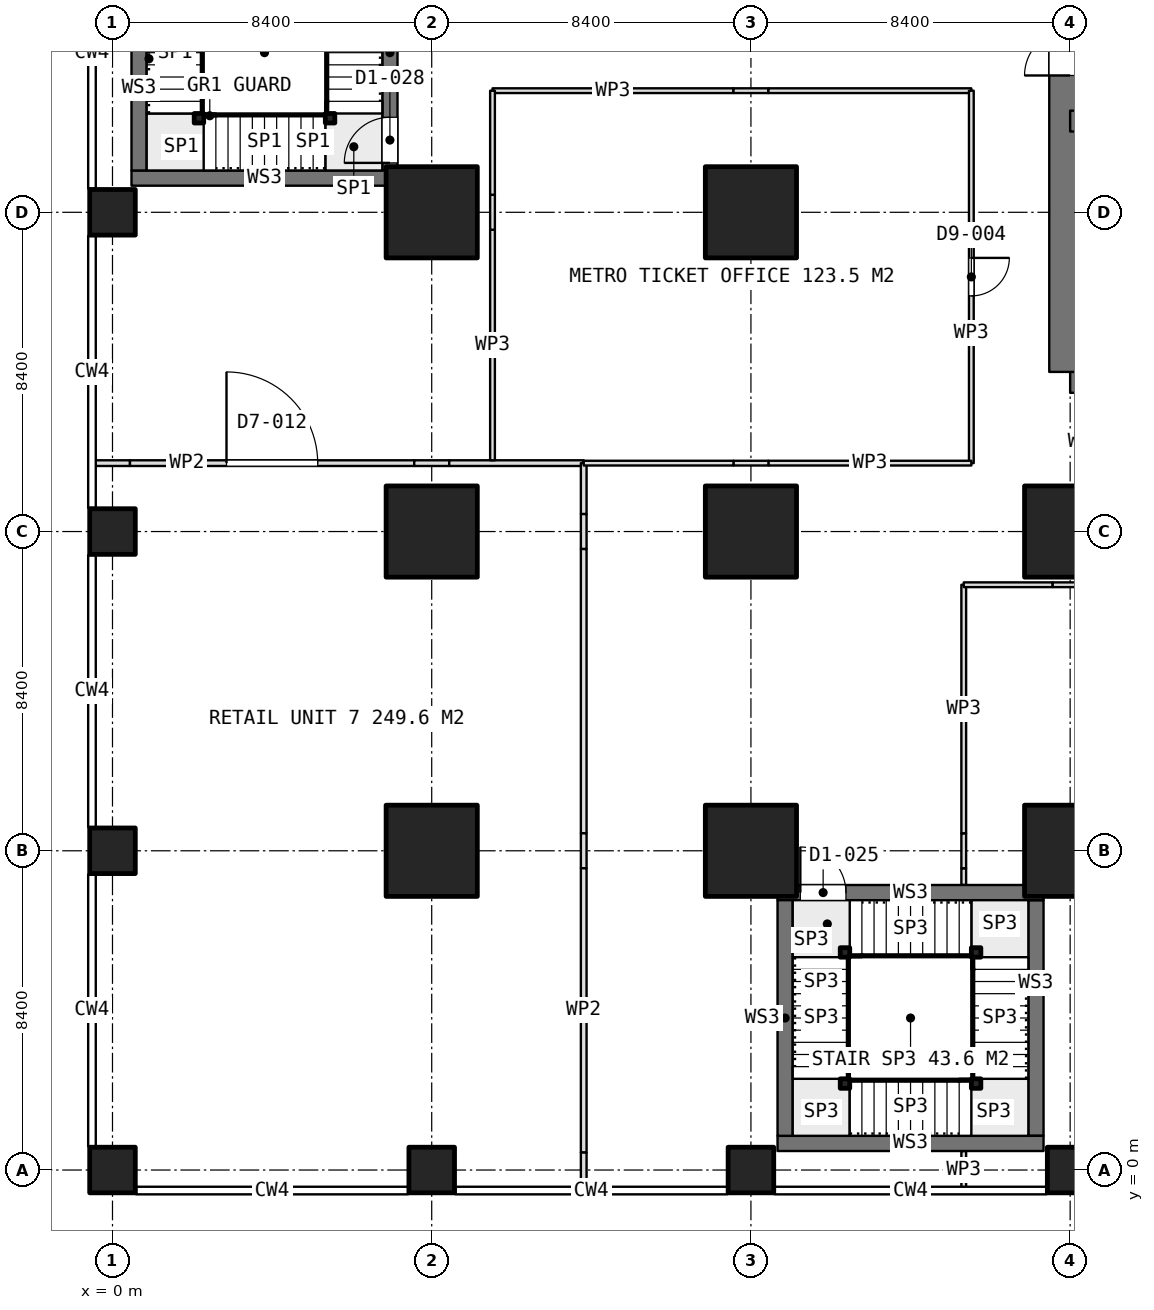
"""IFC4 building model, lengths in metres.
Left out: names, types, materials, properties, quantities, classifications, styles, units other than length and angle.
Written with IfcOpenShell. Run it as: python <this file> out.ifc"""

import sys

from ifc_helpers import new_model, si_unit, direction, frame, frame_2d, origin, origin_2d, place, context, subcontext, project, spatial, rectangle, extrude, element, fill, save


model = new_model("IFC4")
c1 = context("Model", 3, precision=1e-05, world=origin(), true_north=direction((0.0, 1.0)))
c2 = subcontext(c1, "Body", "Model", "MODEL_VIEW")
j1 = project(units=[si_unit("LENGTHUNIT", "METRE"), si_unit("PLANEANGLEUNIT", "RADIAN")], contexts=[c1])
p1 = place(None, origin())
s1 = spatial("IfcSite", under=j1, at=p1, CompositionType="ELEMENT")
p2 = place(p1, origin())
s2 = spatial("IfcBuilding", under=s1, at=p2, CompositionType="ELEMENT")
p3 = place(p2, frame((0.0, 0.0, 5.4)))
s3 = spatial("IfcBuildingStorey", under=s2, at=p3, CompositionType="ELEMENT", Elevation=5.4)
p4 = place(p3, frame((25.2, 21.0, 0.0), z_axis=(0.0, 0.0, 1.0), x_axis=(1.0, 0.0, 0.0)))
e1 = element("IfcWall", 1, at=p4, inside=s3, PredefinedType="SHEAR", context=c2, shape_type="SweptSolid", body=[
    extrude(rectangle(XDim=10.4, YDim=1.1, at=frame_2d((5.2, 0.0))), origin(), (0.0, 0.0, 1.0), 5.0),
])
p5 = place(p3, frame((25.2, 21.0, 0.0), z_axis=(0.0, 0.0, 1.0), x_axis=(0.0, 1.0, 0.0)))
e2 = element("IfcWall", 2, at=p5, inside=s3, PredefinedType="SHEAR", context=c2, shape_type="SweptSolid", body=[
    extrude(rectangle(XDim=25.2, YDim=1.1, at=frame_2d((12.6, 0.0))), origin(), (0.0, 0.0, 1.0), 5.0),
])
p6 = place(p5, frame((7.8, 0.0, 0.0)))
e3 = element("IfcOpeningElement", 3, at=p6, cuts=e2, PredefinedType="OPENING", context=c2, shape_type="SweptSolid", body=[
    extrude(rectangle(XDim=1.2, YDim=2.1, at=frame_2d((0.6, 1.05))), frame((0.0, 0.56, 0.0), z_axis=(0.0, -1.0, 0.0), x_axis=(1.0, 0.0, 0.0)), (0.0, 0.0, 1.0), 1.12),
])
p7 = place(p5, frame((14.25, 0.0, 0.0)))
e4 = element("IfcOpeningElement", 4, at=p7, cuts=e2, PredefinedType="OPENING", context=c2, shape_type="SweptSolid", body=[
    extrude(rectangle(XDim=0.9, YDim=2.1, at=frame_2d((0.45, 1.05))), frame((0.0, 0.56, 0.0), z_axis=(0.0, -1.0, 0.0), x_axis=(1.0, 0.0, 0.0)), (0.0, 0.0, 1.0), 1.12),
])
p8 = place(p5, frame((16.85, 0.0, 0.0)))
e5 = element("IfcOpeningElement", 5, at=p8, cuts=e2, PredefinedType="OPENING", context=c2, shape_type="SweptSolid", body=[
    extrude(rectangle(XDim=0.9, YDim=2.1, at=frame_2d((0.45, 1.05))), frame((0.0, 0.56, 0.0), z_axis=(0.0, -1.0, 0.0), x_axis=(1.0, 0.0, 0.0)), (0.0, 0.0, 1.0), 1.12),
])
p9 = place(p5, frame((19.075, 0.0, 0.0)))
e6 = element("IfcOpeningElement", 6, at=p9, cuts=e2, PredefinedType="OPENING", context=c2, shape_type="SweptSolid", body=[
    extrude(rectangle(XDim=1.2, YDim=2.1, at=frame_2d((0.6, 1.05))), frame((0.0, 0.56, 0.0), z_axis=(0.0, -1.0, 0.0), x_axis=(1.0, 0.0, 0.0)), (0.0, 0.0, 1.0), 1.12),
])
p10 = place(p3, frame((25.2, 27.6, 0.0), z_axis=(0.0, 0.0, 1.0), x_axis=(1.0, 0.0, 0.0)))
e7 = element("IfcWall", 7, at=p10, inside=s3, PredefinedType="SHEAR", context=c2, shape_type="SweptSolid", body=[
    extrude(rectangle(XDim=6.6, YDim=0.55, at=frame_2d((3.3, 0.0))), origin(), (0.0, 0.0, 1.0), 5.0),
])
p11 = place(p10, frame((4.925, 0.0, 0.0)))
e8 = element("IfcOpeningElement", 8, at=p11, cuts=e7, PredefinedType="OPENING", context=c2, shape_type="SweptSolid", body=[
    extrude(rectangle(XDim=1.2, YDim=2.1, at=frame_2d((0.6, 1.05))), frame((0.0, 0.285, 0.0), z_axis=(0.0, -1.0, 0.0), x_axis=(1.0, 0.0, 0.0)), (0.0, 0.0, 1.0), 0.57),
])
for number, where, z_axis, x_axis in (
    (9, (0.0, 0.0, 0.0), (0.0, 0.0, 1.0), (1.0, 0.0, 0.0)),
    (10, (0.0, 8.4, 0.0), (0.0, 0.0, 1.0), (1.0, 0.0, 0.0)),
    (11, (0.0, 16.8, 0.0), (0.0, 0.0, 1.0), (1.0, 0.0, 0.0)),
    (12, (0.0, 25.2, 0.0), (0.0, 0.0, 1.0), (1.0, 0.0, 0.0)),
    (13, (8.4, 0.0, 0.0), (0.0, 0.0, 1.0), (1.0, 0.0, 0.0)),
):
    element("IfcColumn", number, at=place(p3, frame(where, z_axis=z_axis, x_axis=x_axis)), inside=s3, PredefinedType="COLUMN", context=c2, shape_type="SweptSolid", body=[
        extrude(rectangle(XDim=1.2, YDim=1.2, at=origin_2d()), origin(), (0.0, 0.0, 1.0), 5.0),
    ])
for number, where, z_axis, x_axis in (
    (14, (8.4, 8.4, 0.0), (0.0, 0.0, 1.0), (1.0, 0.0, 0.0)),
    (15, (8.4, 16.8, 0.0), (0.0, 0.0, 1.0), (1.0, 0.0, 0.0)),
    (16, (8.4, 25.2, 0.0), (0.0, 0.0, 1.0), (1.0, 0.0, 0.0)),
):
    element("IfcColumn", number, at=place(p3, frame(where, z_axis=z_axis, x_axis=x_axis)), inside=s3, PredefinedType="COLUMN", context=c2, shape_type="SweptSolid", body=[
        extrude(rectangle(XDim=2.4, YDim=2.4, at=origin_2d()), origin(), (0.0, 0.0, 1.0), 5.0),
    ])
p12 = place(p3, frame((16.8, 0.0, 0.0), z_axis=(0.0, 0.0, 1.0), x_axis=(1.0, 0.0, 0.0)))
e17 = element("IfcColumn", 17, at=p12, inside=s3, PredefinedType="COLUMN", context=c2, shape_type="SweptSolid", body=[
    extrude(rectangle(XDim=1.2, YDim=1.2, at=origin_2d()), origin(), (0.0, 0.0, 1.0), 5.0),
])
for number, where, z_axis, x_axis in (
    (18, (16.8, 8.4, 0.0), (0.0, 0.0, 1.0), (1.0, 0.0, 0.0)),
    (19, (16.8, 16.8, 0.0), (0.0, 0.0, 1.0), (1.0, 0.0, 0.0)),
    (20, (16.8, 25.2, 0.0), (0.0, 0.0, 1.0), (1.0, 0.0, 0.0)),
):
    element("IfcColumn", number, at=place(p3, frame(where, z_axis=z_axis, x_axis=x_axis)), inside=s3, PredefinedType="COLUMN", context=c2, shape_type="SweptSolid", body=[
        extrude(rectangle(XDim=2.4, YDim=2.4, at=origin_2d()), origin(), (0.0, 0.0, 1.0), 5.0),
    ])
p13 = place(p3, frame((25.2, 0.0, 0.0), z_axis=(0.0, 0.0, 1.0), x_axis=(1.0, 0.0, 0.0)))
e21 = element("IfcColumn", 21, at=p13, inside=s3, PredefinedType="COLUMN", context=c2, shape_type="SweptSolid", body=[
    extrude(rectangle(XDim=1.2, YDim=1.2, at=origin_2d()), origin(), (0.0, 0.0, 1.0), 5.0),
])
for number, where, z_axis, x_axis in (
    (22, (25.2, 8.4, 0.0), (0.0, 0.0, 1.0), (1.0, 0.0, 0.0)),
    (23, (25.2, 16.8, 0.0), (0.0, 0.0, 1.0), (1.0, 0.0, 0.0)),
):
    element("IfcColumn", number, at=place(p3, frame(where, z_axis=z_axis, x_axis=x_axis)), inside=s3, PredefinedType="COLUMN", context=c2, shape_type="SweptSolid", body=[
        extrude(rectangle(XDim=2.4, YDim=2.4, at=origin_2d()), origin(), (0.0, 0.0, 1.0), 5.0),
    ])
p14 = place(p3, frame((0.5, 26.1, 0.0), z_axis=(0.0, 0.0, 1.0), x_axis=(1.0, 0.0, 0.0)))
e24 = element("IfcWall", 24, at=p14, inside=s3, PredefinedType="SOLIDWALL", context=c2, shape_type="SweptSolid", body=[
    extrude(rectangle(XDim=7.0, YDim=0.4, at=frame_2d((3.5, 0.0))), origin(), (0.0, 0.0, 1.0), 4.7),
])
p15 = place(p3, frame((0.7, 26.3, 0.0), z_axis=(0.0, 0.0, 1.0), x_axis=(0.0, 1.0, 0.0)))
e25 = element("IfcWall", 25, at=p15, inside=s3, PredefinedType="SOLIDWALL", context=c2, shape_type="SweptSolid", body=[
    extrude(rectangle(XDim=6.2, YDim=0.4, at=frame_2d((3.1, 0.0))), origin(), (0.0, 0.0, 1.0), 4.7),
])
p16 = place(p3, frame((7.3, 26.3, 0.0), z_axis=(0.0, 0.0, 1.0), x_axis=(0.0, 1.0, 0.0)))
e26 = element("IfcWall", 26, at=p16, inside=s3, PredefinedType="SOLIDWALL", context=c2, shape_type="SweptSolid", body=[
    extrude(rectangle(XDim=6.2, YDim=0.4, at=frame_2d((3.1, 0.0))), origin(), (0.0, 0.0, 1.0), 4.7),
])
p17 = place(p16, frame((0.2, 0.0, 0.0)))
e27 = element("IfcOpeningElement", 27, at=p17, cuts=e26, PredefinedType="OPENING", context=c2, shape_type="SweptSolid", body=[
    extrude(rectangle(XDim=1.2, YDim=2.1, at=frame_2d((0.6, 1.05))), frame((0.0, 0.21, 0.0), z_axis=(0.0, -1.0, 0.0), x_axis=(1.0, 0.0, 0.0)), (0.0, 0.0, 1.0), 0.42),
])
p18 = place(p3, frame((17.5, 0.7, 0.0), z_axis=(0.0, 0.0, 1.0), x_axis=(1.0, 0.0, 0.0)))
e28 = element("IfcWall", 28, at=p18, inside=s3, PredefinedType="SOLIDWALL", context=c2, shape_type="SweptSolid", body=[
    extrude(rectangle(XDim=7.0, YDim=0.4, at=frame_2d((3.5, 0.0))), origin(), (0.0, 0.0, 1.0), 4.7),
])
p19 = place(p3, frame((17.5, 7.3, 0.0), z_axis=(0.0, 0.0, 1.0), x_axis=(1.0, 0.0, 0.0)))
e29 = element("IfcWall", 29, at=p19, inside=s3, PredefinedType="SOLIDWALL", context=c2, shape_type="SweptSolid", body=[
    extrude(rectangle(XDim=7.0, YDim=0.4, at=frame_2d((3.5, 0.0))), origin(), (0.0, 0.0, 1.0), 4.7),
])
p20 = place(p19, frame((0.6, 0.0, 0.0)))
e30 = element("IfcOpeningElement", 30, at=p20, cuts=e29, PredefinedType="OPENING", context=c2, shape_type="SweptSolid", body=[
    extrude(rectangle(XDim=1.2, YDim=2.1, at=frame_2d((0.6, 1.05))), frame((0.0, 0.21, 0.0), z_axis=(0.0, -1.0, 0.0), x_axis=(1.0, 0.0, 0.0)), (0.0, 0.0, 1.0), 0.42),
])
for number, where, z_axis, x_axis in (
    (31, (17.7, 0.9, 0.0), (0.0, 0.0, 1.0), (0.0, 1.0, 0.0)),
    (32, (24.3, 0.9, 0.0), (0.0, 0.0, 1.0), (0.0, 1.0, 0.0)),
):
    element("IfcWall", number, at=place(p3, frame(where, z_axis=z_axis, x_axis=x_axis)), inside=s3, PredefinedType="SOLIDWALL", context=c2, shape_type="SweptSolid", body=[
        extrude(rectangle(XDim=6.2, YDim=0.4, at=frame_2d((3.1, 0.0))), origin(), (0.0, 0.0, 1.0), 4.7),
    ])
p21 = place(p3, frame((22.4, 7.5, 0.0), z_axis=(0.0, 0.0, 1.0), x_axis=(0.0, 1.0, 0.0)))
e33 = element("IfcWall", 33, at=p21, inside=s3, PredefinedType="PARTITIONING", context=c2, shape_type="SweptSolid", body=[
    extrude(rectangle(XDim=0.44, YDim=0.125, at=frame_2d((0.22, 0.0))), origin(), (0.0, 0.0, 1.0), 4.7),
])
p22 = place(p3, frame((22.4, 7.94, 0.0), z_axis=(0.0, 0.0, 1.0), x_axis=(0.0, 1.0, 0.0)))
e34 = element("IfcWall", 34, at=p22, inside=s3, PredefinedType="PARTITIONING", context=c2, shape_type="SweptSolid", body=[
    extrude(rectangle(XDim=0.92, YDim=0.125, at=frame_2d((0.46, 0.0))), origin(), (0.0, 0.0, 1.0), 2.9),
])
p23 = place(p3, frame((22.4, 8.86, 0.0), z_axis=(0.0, 0.0, 1.0), x_axis=(0.0, 1.0, 0.0)))
e35 = element("IfcWall", 35, at=p23, inside=s3, PredefinedType="PARTITIONING", context=c2, shape_type="SweptSolid", body=[
    extrude(rectangle(XDim=6.54, YDim=0.125, at=frame_2d((3.27, 0.0))), origin(), (0.0, 0.0, 1.0), 4.7),
])
p24 = place(p3, frame((22.4, 15.4, 0.0), z_axis=(0.0, 0.0, 1.0), x_axis=(1.0, 0.0, 0.0)))
e36 = element("IfcWall", 36, at=p24, inside=s3, PredefinedType="PARTITIONING", context=c2, shape_type="SweptSolid", body=[
    extrude(rectangle(XDim=2.34, YDim=0.125, at=frame_2d((1.17, 0.0))), origin(), (0.0, 0.0, 1.0), 4.7),
])
p25 = place(p3, frame((24.74, 15.4, 0.0), z_axis=(0.0, 0.0, 1.0), x_axis=(1.0, 0.0, 0.0)))
e37 = element("IfcWall", 37, at=p25, inside=s3, PredefinedType="PARTITIONING", context=c2, shape_type="SweptSolid", body=[
    extrude(rectangle(XDim=0.92, YDim=0.125, at=frame_2d((0.46, 0.0))), origin(), (0.0, 0.0, 1.0), 2.9),
])
p26 = place(p3, frame((22.4, -0.49, 0.0), z_axis=(0.0, 0.0, 1.0), x_axis=(0.0, 1.0, 0.0)))
e38 = element("IfcWall", 38, at=p26, inside=s3, PredefinedType="PARTITIONING", context=c2, shape_type="SweptSolid", body=[
    extrude(rectangle(XDim=0.99, YDim=0.125, at=frame_2d((0.495, 0.0))), origin(), (0.0, 0.0, 1.0), 2.9),
])
p27 = place(p3, frame((-0.49, 18.6, 0.0), z_axis=(0.0, 0.0, 1.0), x_axis=(1.0, 0.0, 0.0)))
e39 = element("IfcWall", 39, at=p27, inside=s3, PredefinedType="PARTITIONING", context=c2, shape_type="SweptSolid", body=[
    extrude(rectangle(XDim=0.95, YDim=0.15, at=frame_2d((0.475, 0.0))), origin(), (0.0, 0.0, 1.0), 2.9),
])
p28 = place(p3, frame((0.46, 18.6, 0.0), z_axis=(0.0, 0.0, 1.0), x_axis=(1.0, 0.0, 0.0)))
e40 = element("IfcWall", 40, at=p28, inside=s3, PredefinedType="PARTITIONING", context=c2, shape_type="SweptSolid", body=[
    extrude(rectangle(XDim=7.48, YDim=0.15, at=frame_2d((3.74, 0.0))), origin(), (0.0, 0.0, 1.0), 4.7),
])
p29 = place(p28, frame((2.54, 0.0, 0.0)))
e41 = element("IfcOpeningElement", 41, at=p29, cuts=e40, PredefinedType="OPENING", context=c2, shape_type="SweptSolid", body=[
    extrude(rectangle(XDim=2.4, YDim=2.4, at=frame_2d((1.2, 1.2))), frame((0.0, 0.085, 0.0), z_axis=(0.0, -1.0, 0.0), x_axis=(1.0, 0.0, 0.0)), (0.0, 0.0, 1.0), 0.17),
])
p30 = place(p3, frame((7.94, 18.6, 0.0), z_axis=(0.0, 0.0, 1.0), x_axis=(1.0, 0.0, 0.0)))
e42 = element("IfcWall", 42, at=p30, inside=s3, PredefinedType="PARTITIONING", context=c2, shape_type="SweptSolid", body=[
    extrude(rectangle(XDim=0.92, YDim=0.15, at=frame_2d((0.46, 0.0))), origin(), (0.0, 0.0, 1.0), 2.9),
])
p31 = place(p3, frame((8.86, 18.6, 0.0), z_axis=(0.0, 0.0, 1.0), x_axis=(1.0, 0.0, 0.0)))
e43 = element("IfcWall", 43, at=p31, inside=s3, PredefinedType="PARTITIONING", context=c2, shape_type="SweptSolid", body=[
    extrude(rectangle(XDim=3.54, YDim=0.15, at=frame_2d((1.77, 0.0))), origin(), (0.0, 0.0, 1.0), 4.7),
])
p32 = place(p3, frame((12.4, 18.6, 0.0), z_axis=(0.0, 0.0, 1.0), x_axis=(0.0, -1.0, 0.0)))
e44 = element("IfcWall", 44, at=p32, inside=s3, PredefinedType="PARTITIONING", context=c2, shape_type="SweptSolid", body=[
    extrude(rectangle(XDim=1.34, YDim=0.15, at=frame_2d((0.67, 0.0))), origin(), (0.0, 0.0, 1.0), 4.7),
])
p33 = place(p3, frame((12.4, 17.26, 0.0), z_axis=(0.0, 0.0, 1.0), x_axis=(0.0, -1.0, 0.0)))
e45 = element("IfcWall", 45, at=p33, inside=s3, PredefinedType="PARTITIONING", context=c2, shape_type="SweptSolid", body=[
    extrude(rectangle(XDim=0.92, YDim=0.15, at=frame_2d((0.46, 0.0))), origin(), (0.0, 0.0, 1.0), 2.9),
])
p34 = place(p3, frame((12.4, 16.34, 0.0), z_axis=(0.0, 0.0, 1.0), x_axis=(0.0, -1.0, 0.0)))
e46 = element("IfcWall", 46, at=p34, inside=s3, PredefinedType="PARTITIONING", context=c2, shape_type="SweptSolid", body=[
    extrude(rectangle(XDim=7.48, YDim=0.15, at=frame_2d((3.74, 0.0))), origin(), (0.0, 0.0, 1.0), 4.7),
])
p35 = place(p3, frame((12.4, 8.86, 0.0), z_axis=(0.0, 0.0, 1.0), x_axis=(0.0, -1.0, 0.0)))
e47 = element("IfcWall", 47, at=p35, inside=s3, PredefinedType="PARTITIONING", context=c2, shape_type="SweptSolid", body=[
    extrude(rectangle(XDim=0.92, YDim=0.15, at=frame_2d((0.46, 0.0))), origin(), (0.0, 0.0, 1.0), 2.9),
])
p36 = place(p3, frame((12.4, 7.94, 0.0), z_axis=(0.0, 0.0, 1.0), x_axis=(0.0, -1.0, 0.0)))
e48 = element("IfcWall", 48, at=p36, inside=s3, PredefinedType="PARTITIONING", context=c2, shape_type="SweptSolid", body=[
    extrude(rectangle(XDim=7.48, YDim=0.15, at=frame_2d((3.74, 0.0))), origin(), (0.0, 0.0, 1.0), 4.7),
])
p37 = place(p3, frame((12.4, 0.46, 0.0), z_axis=(0.0, 0.0, 1.0), x_axis=(0.0, -1.0, 0.0)))
e49 = element("IfcWall", 49, at=p37, inside=s3, PredefinedType="PARTITIONING", context=c2, shape_type="SweptSolid", body=[
    extrude(rectangle(XDim=0.95, YDim=0.15, at=frame_2d((0.475, 0.0))), origin(), (0.0, 0.0, 1.0), 2.9),
])
p38 = place(p3, frame((10.0, 28.4, 0.0), z_axis=(0.0, 0.0, 1.0), x_axis=(1.0, 0.0, 0.0)))
e50 = element("IfcWall", 50, at=p38, inside=s3, PredefinedType="PARTITIONING", context=c2, shape_type="SweptSolid", body=[
    extrude(rectangle(XDim=6.34, YDim=0.125, at=frame_2d((3.17, 0.0))), origin(), (0.0, 0.0, 1.0), 4.7),
])
p39 = place(p3, frame((16.34, 28.4, 0.0), z_axis=(0.0, 0.0, 1.0), x_axis=(1.0, 0.0, 0.0)))
e51 = element("IfcWall", 51, at=p39, inside=s3, PredefinedType="PARTITIONING", context=c2, shape_type="SweptSolid", body=[
    extrude(rectangle(XDim=0.92, YDim=0.125, at=frame_2d((0.46, 0.0))), origin(), (0.0, 0.0, 1.0), 2.9),
])
p40 = place(p3, frame((17.26, 28.4, 0.0), z_axis=(0.0, 0.0, 1.0), x_axis=(1.0, 0.0, 0.0)))
e52 = element("IfcWall", 52, at=p40, inside=s3, PredefinedType="PARTITIONING", context=c2, shape_type="SweptSolid", body=[
    extrude(rectangle(XDim=5.34, YDim=0.125, at=frame_2d((2.67, 0.0))), origin(), (0.0, 0.0, 1.0), 4.7),
])
p41 = place(p3, frame((22.6, 28.4, 0.0), z_axis=(0.0, 0.0, 1.0), x_axis=(0.0, -1.0, 0.0)))
e53 = element("IfcWall", 53, at=p41, inside=s3, PredefinedType="PARTITIONING", context=c2, shape_type="SweptSolid", body=[
    extrude(rectangle(XDim=9.8, YDim=0.125, at=frame_2d((4.9, 0.0))), origin(), (0.0, 0.0, 1.0), 4.7),
])
p42 = place(p41, frame((4.4, 0.0, 0.0)))
e54 = element("IfcOpeningElement", 54, at=p42, cuts=e53, PredefinedType="OPENING", context=c2, shape_type="SweptSolid", body=[
    extrude(rectangle(XDim=1.0, YDim=2.1, at=frame_2d((0.5, 1.05))), frame((0.0, 0.073, 0.0), z_axis=(0.0, -1.0, 0.0), x_axis=(1.0, 0.0, 0.0)), (0.0, 0.0, 1.0), 0.145),
])
p43 = place(p3, frame((22.6, 18.6, 0.0), z_axis=(0.0, 0.0, 1.0), x_axis=(-1.0, 0.0, 0.0)))
e55 = element("IfcWall", 55, at=p43, inside=s3, PredefinedType="PARTITIONING", context=c2, shape_type="SweptSolid", body=[
    extrude(rectangle(XDim=5.34, YDim=0.125, at=frame_2d((2.67, 0.0))), origin(), (0.0, 0.0, 1.0), 4.7),
])
p44 = place(p3, frame((17.26, 18.6, 0.0), z_axis=(0.0, 0.0, 1.0), x_axis=(-1.0, 0.0, 0.0)))
e56 = element("IfcWall", 56, at=p44, inside=s3, PredefinedType="PARTITIONING", context=c2, shape_type="SweptSolid", body=[
    extrude(rectangle(XDim=0.92, YDim=0.125, at=frame_2d((0.46, 0.0))), origin(), (0.0, 0.0, 1.0), 2.9),
])
p45 = place(p3, frame((16.34, 18.6, 0.0), z_axis=(0.0, 0.0, 1.0), x_axis=(-1.0, 0.0, 0.0)))
e57 = element("IfcWall", 57, at=p45, inside=s3, PredefinedType="PARTITIONING", context=c2, shape_type="SweptSolid", body=[
    extrude(rectangle(XDim=3.94, YDim=0.125, at=frame_2d((1.97, 0.0))), origin(), (0.0, 0.0, 1.0), 4.7),
])
p46 = place(p3, frame((10.0, 18.675, 0.0), z_axis=(0.0, 0.0, 1.0), x_axis=(0.0, 1.0, 0.0)))
e58 = element("IfcWall", 58, at=p46, inside=s3, PredefinedType="PARTITIONING", context=c2, shape_type="SweptSolid", body=[
    extrude(rectangle(XDim=6.065, YDim=0.125, at=frame_2d((3.032, 0.0))), origin(), (0.0, 0.0, 1.0), 4.7),
])
p47 = place(p3, frame((10.0, 24.74, 0.0), z_axis=(0.0, 0.0, 1.0), x_axis=(0.0, 1.0, 0.0)))
e59 = element("IfcWall", 59, at=p47, inside=s3, PredefinedType="PARTITIONING", context=c2, shape_type="SweptSolid", body=[
    extrude(rectangle(XDim=0.92, YDim=0.125, at=frame_2d((0.46, 0.0))), origin(), (0.0, 0.0, 1.0), 2.9),
])
p48 = place(p3, frame((10.0, 25.66, 0.0), z_axis=(0.0, 0.0, 1.0), x_axis=(0.0, 1.0, 0.0)))
e60 = element("IfcWall", 60, at=p48, inside=s3, PredefinedType="PARTITIONING", context=c2, shape_type="SweptSolid", body=[
    extrude(rectangle(XDim=2.74, YDim=0.125, at=frame_2d((1.37, 0.0))), origin(), (0.0, 0.0, 1.0), 4.7),
])
for number, where, z_axis, x_axis in (
    (61, (5.725, 27.675, 0.0), (0.0, 0.0, 1.0), (1.0, 0.0, 0.0)),
    (62, (2.275, 27.675, 0.0), (0.0, 0.0, 1.0), (1.0, 0.0, 0.0)),
    (63, (19.275, 5.725, 0.0), (0.0, 0.0, 1.0), (1.0, 0.0, 0.0)),
    (64, (19.275, 2.275, 0.0), (0.0, 0.0, 1.0), (1.0, 0.0, 0.0)),
    (65, (22.725, 2.275, 0.0), (0.0, 0.0, 1.0), (1.0, 0.0, 0.0)),
    (66, (22.725, 5.725, 0.0), (0.0, 0.0, 1.0), (1.0, 0.0, 0.0)),
):
    element("IfcColumn", number, at=place(p3, frame(where, z_axis=z_axis, x_axis=x_axis)), inside=s3, PredefinedType="COLUMN", context=c2, shape_type="SweptSolid", body=[
        extrude(rectangle(XDim=0.25, YDim=0.25, at=origin_2d()), origin(), (0.0, 0.0, 1.0), 5.0),
    ])
p49 = place(p6, origin())
e67 = element("IfcDoor", 67, at=p49, inside=s3, OperationType="SINGLE_SWING_LEFT", PredefinedType="DOOR", context=c2, shape_type="SweptSolid", body=[
    extrude(rectangle(XDim=1.2, YDim=2.1, at=frame_2d((0.6, 1.05))), frame((0.0, 0.025, 0.0), z_axis=(0.0, -1.0, 0.0), x_axis=(1.0, 0.0, 0.0)), (0.0, 0.0, 1.0), 0.05),
])
fill(e3, e67)
p50 = place(p29, origin())
e68 = element("IfcDoor", 68, at=p50, inside=s3, OperationType="DOUBLE_DOOR_SINGLE_SWING", PredefinedType="DOOR", context=c2, shape_type="SweptSolid", body=[
    extrude(rectangle(XDim=2.4, YDim=2.4, at=frame_2d((1.2, 1.2))), frame((0.0, 0.025, 0.0), z_axis=(0.0, -1.0, 0.0), x_axis=(1.0, 0.0, 0.0)), (0.0, 0.0, 1.0), 0.05),
])
fill(e41, e68)
p51 = place(p42, origin())
e69 = element("IfcDoor", 69, at=p51, inside=s3, OperationType="SINGLE_SWING_LEFT", PredefinedType="DOOR", context=c2, shape_type="SweptSolid", body=[
    extrude(rectangle(XDim=1.0, YDim=2.1, at=frame_2d((0.5, 1.05))), frame((0.0, 0.025, 0.0), z_axis=(0.0, -1.0, 0.0), x_axis=(1.0, 0.0, 0.0)), (0.0, 0.0, 1.0), 0.05),
])
fill(e54, e69)
p52 = place(p17, origin())
e70 = element("IfcDoor", 70, at=p52, inside=s3, OperationType="SINGLE_SWING_RIGHT", PredefinedType="DOOR", context=c2, shape_type="SweptSolid", body=[
    extrude(rectangle(XDim=1.2, YDim=2.1, at=frame_2d((0.6, 1.05))), frame((0.0, 0.025, 0.0), z_axis=(0.0, -1.0, 0.0), x_axis=(1.0, 0.0, 0.0)), (0.0, 0.0, 1.0), 0.05),
])
fill(e27, e70)
p53 = place(p20, origin())
e71 = element("IfcDoor", 71, at=p53, inside=s3, OperationType="SINGLE_SWING_RIGHT", PredefinedType="DOOR", context=c2, shape_type="SweptSolid", body=[
    extrude(rectangle(XDim=1.2, YDim=2.1, at=frame_2d((0.6, 1.05))), frame((0.0, 0.025, 0.0), z_axis=(0.0, -1.0, 0.0), x_axis=(1.0, 0.0, 0.0)), (0.0, 0.0, 1.0), 0.05),
])
fill(e30, e71)
save(model, sys.argv[1])
